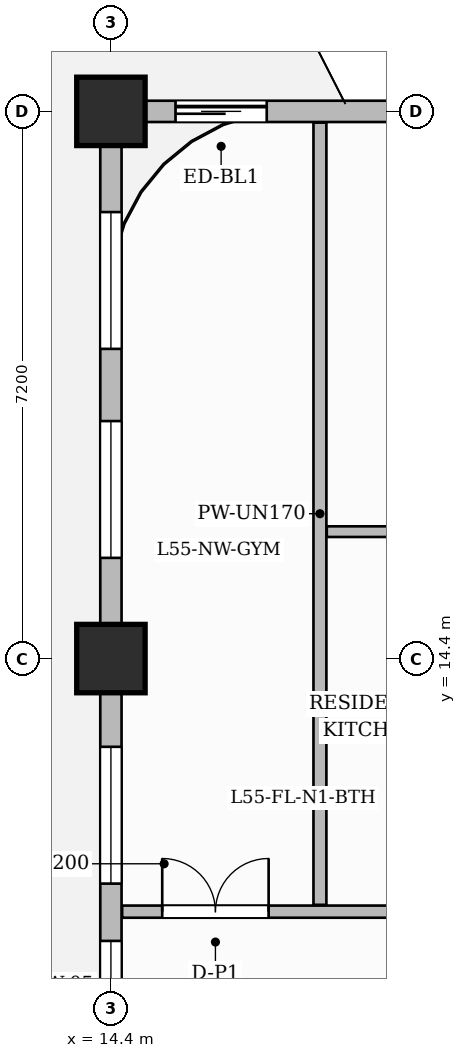
"""IFC4 building model, lengths in metres.
Left out: names, types, materials, properties, quantities, classifications, styles, units other than length and angle.
Written with IfcOpenShell. Run it as: python <this file> out.ifc"""

import sys

from ifc_helpers import new_model, si_unit, direction, frame, frame_2d, origin, origin_2d, place, context, subcontext, project, spatial, rectangle, extrude, source, transform, mapped, element, fill, save


model = new_model("IFC4")
c1 = context("Model", 3, precision=1e-05, world=origin(), true_north=direction((0.0, 1.0)))
c2 = subcontext(c1, "Body", "Model", "MODEL_VIEW")
j1 = project(units=[si_unit("LENGTHUNIT", "METRE"), si_unit("PLANEANGLEUNIT", "RADIAN")], contexts=[c1])
p1 = place(None, origin())
s1 = spatial("IfcSite", under=j1, at=p1, CompositionType="ELEMENT")
p2 = place(p1, origin())
s2 = spatial("IfcBuilding", under=s1, at=p2, CompositionType="ELEMENT")
p3 = place(p2, frame((0.0, 0.0, 221.15)))
s3 = spatial("IfcBuildingStorey", under=s2, at=p3, CompositionType="ELEMENT", Elevation=221.15)
m1 = source(origin(), c2, "Body", "SweptSolid", [
    extrude(rectangle(XDim=0.9, YDim=0.9, at=origin_2d()), origin(), (0.0, 0.0, 1.0), 3.85),
])
for number, where, z_axis, x_axis in (
    (1, (14.4, 14.4, 0.0), (0.0, 0.0, 1.0), (1.0, 0.0, 0.0)),
    (2, (14.4, 21.6, 0.0), (0.0, 0.0, 1.0), (1.0, 0.0, 0.0)),
):
    element("IfcColumn", number, at=place(p3, frame(where, z_axis=z_axis, x_axis=x_axis)), inside=s3, PredefinedType="COLUMN", context=c2, shape_type="MappedRepresentation", body=[
        mapped(m1, transform((0.0, 0.0, 0.0), scale=1.0)),
    ])
p4 = place(p3, frame((14.548, 11.07, 0.0), z_axis=(0.0, 0.0, 1.0), x_axis=(1.0, 0.0, 0.0)))
e3 = element("IfcWall", 3, at=p4, inside=s3, PredefinedType="PARTITIONING", context=c2, shape_type="SweptSolid", body=[
    extrude(rectangle(XDim=15.562, YDim=0.16, at=frame_2d((7.781, 0.0))), origin(), (0.0, 0.0, 1.0), 3.6),
])
p5 = place(p4, frame((0.527, 0.0, 0.0)))
e4 = element("IfcOpeningElement", 4, at=p5, cuts=e3, PredefinedType="OPENING", context=c2, shape_type="SweptSolid", body=[
    extrude(rectangle(XDim=1.4, YDim=2.35, at=frame_2d((0.7, 1.175))), frame((0.0, 0.09, 0.0), z_axis=(0.0, -1.0, 0.0), x_axis=(1.0, 0.0, 0.0)), (0.0, 0.0, 1.0), 0.18),
])
p6 = place(p4, frame((6.527, 0.0, 0.0)))
e5 = element("IfcOpeningElement", 5, at=p6, cuts=e3, PredefinedType="OPENING", context=c2, shape_type="SweptSolid", body=[
    extrude(rectangle(XDim=1.05, YDim=2.25, at=frame_2d((0.525, 1.125))), frame((0.0, 0.09, 0.0), z_axis=(0.0, -1.0, 0.0), x_axis=(1.0, 0.0, 0.0)), (0.0, 0.0, 1.0), 0.18),
])
p7 = place(p3, frame((17.15, 11.16, 0.0), z_axis=(0.0, 0.0, 1.0), x_axis=(0.0, 1.0, 0.0)))
e6 = element("IfcWall", 6, at=p7, inside=s3, PredefinedType="PARTITIONING", context=c2, shape_type="SweptSolid", body=[
    extrude(rectangle(XDim=10.292, YDim=0.17, at=frame_2d((5.146, 0.0))), origin(), (0.0, 0.0, 1.0), 3.6),
])
for number, where, z_axis, x_axis in (
    (7, (17.24, 13.42, 0.0), (0.0, 0.0, 1.0), (1.0, 0.0, 0.0)),
    (8, (17.24, 16.07, 0.0), (0.0, 0.0, 1.0), (1.0, 0.0, 0.0)),
):
    element("IfcWall", number, at=place(p3, frame(where, z_axis=z_axis, x_axis=x_axis)), inside=s3, PredefinedType="PARTITIONING", context=c2, shape_type="SweptSolid", body=[
        extrude(rectangle(XDim=2.07, YDim=0.14, at=frame_2d((1.035, 0.0))), origin(), (0.0, 0.0, 1.0), 3.6),
    ])
p8 = place(p3, frame((14.4, 21.6, 0.0), z_axis=(0.0, 0.0, 1.0), x_axis=(1.0, 0.0, 0.0)))
e9 = element("IfcWall", 9, at=p8, inside=s3, PredefinedType="SOLIDWALL", context=c2, shape_type="SweptSolid", body=[
    extrude(rectangle(XDim=35.4, YDim=0.28, at=frame_2d((17.7, 0.0))), origin(), (0.0, 0.0, 1.0), 3.135),
])
p9 = place(p8, frame((0.85, 0.0, 0.0)))
e10 = element("IfcOpeningElement", 10, at=p9, cuts=e9, PredefinedType="OPENING", context=c2, shape_type="SweptSolid", body=[
    extrude(rectangle(XDim=1.2, YDim=2.2, at=frame_2d((0.6, 1.1))), frame((0.0, 0.15, 0.0), z_axis=(0.0, -1.0, 0.0), x_axis=(1.0, 0.0, 0.0)), (0.0, 0.0, 1.0), 0.3),
])
p10 = place(p8, frame((3.679, 0.0, 0.8)))
e11 = element("IfcOpeningElement", 11, at=p10, cuts=e9, PredefinedType="OPENING", context=c2, shape_type="SweptSolid", body=[
    extrude(rectangle(XDim=1.8, YDim=1.85, at=frame_2d((0.9, 0.925))), frame((0.0, 0.15, 0.0), z_axis=(0.0, -1.0, 0.0), x_axis=(1.0, 0.0, 0.0)), (0.0, 0.0, 1.0), 0.3),
])
p11 = place(p8, frame((8.181, 0.0, 0.8)))
e12 = element("IfcOpeningElement", 12, at=p11, cuts=e9, PredefinedType="OPENING", context=c2, shape_type="SweptSolid", body=[
    extrude(rectangle(XDim=0.95, YDim=1.75, at=frame_2d((0.475, 0.875))), frame((0.0, 0.15, 0.0), z_axis=(0.0, -1.0, 0.0), x_axis=(1.0, 0.0, 0.0)), (0.0, 0.0, 1.0), 0.3),
])
p12 = place(p8, frame((10.564, 0.0, 0.8)))
e13 = element("IfcOpeningElement", 13, at=p12, cuts=e9, PredefinedType="OPENING", context=c2, shape_type="SweptSolid", body=[
    extrude(rectangle(XDim=1.8, YDim=1.85, at=frame_2d((0.9, 0.925))), frame((0.0, 0.15, 0.0), z_axis=(0.0, -1.0, 0.0), x_axis=(1.0, 0.0, 0.0)), (0.0, 0.0, 1.0), 0.3),
])
p13 = place(p8, frame((16.551, 0.0, 0.8)))
e14 = element("IfcOpeningElement", 14, at=p13, cuts=e9, PredefinedType="OPENING", context=c2, shape_type="SweptSolid", body=[
    extrude(rectangle(XDim=1.8, YDim=1.85, at=frame_2d((0.9, 0.925))), frame((0.0, 0.15, 0.0), z_axis=(0.0, -1.0, 0.0), x_axis=(1.0, 0.0, 0.0)), (0.0, 0.0, 1.0), 0.3),
])
p14 = place(p8, frame((22.196, 0.0, 0.8)))
e15 = element("IfcOpeningElement", 15, at=p14, cuts=e9, PredefinedType="OPENING", context=c2, shape_type="SweptSolid", body=[
    extrude(rectangle(XDim=1.8, YDim=1.85, at=frame_2d((0.9, 0.925))), frame((0.0, 0.15, 0.0), z_axis=(0.0, -1.0, 0.0), x_axis=(1.0, 0.0, 0.0)), (0.0, 0.0, 1.0), 0.3),
])
p15 = place(p8, frame((25.329, 0.0, 0.8)))
e16 = element("IfcOpeningElement", 16, at=p15, cuts=e9, PredefinedType="OPENING", context=c2, shape_type="SweptSolid", body=[
    extrude(rectangle(XDim=1.15, YDim=1.8, at=frame_2d((0.575, 0.9))), frame((0.0, 0.15, 0.0), z_axis=(0.0, -1.0, 0.0), x_axis=(1.0, 0.0, 0.0)), (0.0, 0.0, 1.0), 0.3),
])
p16 = place(p8, frame((28.721, 0.0, 0.8)))
e17 = element("IfcOpeningElement", 17, at=p16, cuts=e9, PredefinedType="OPENING", context=c2, shape_type="SweptSolid", body=[
    extrude(rectangle(XDim=0.95, YDim=1.75, at=frame_2d((0.475, 0.875))), frame((0.0, 0.15, 0.0), z_axis=(0.0, -1.0, 0.0), x_axis=(1.0, 0.0, 0.0)), (0.0, 0.0, 1.0), 0.3),
])
p17 = place(p8, frame((31.404, 0.0, 0.8)))
e18 = element("IfcOpeningElement", 18, at=p17, cuts=e9, PredefinedType="OPENING", context=c2, shape_type="SweptSolid", body=[
    extrude(rectangle(XDim=1.8, YDim=1.85, at=frame_2d((0.9, 0.925))), frame((0.0, 0.15, 0.0), z_axis=(0.0, -1.0, 0.0), x_axis=(1.0, 0.0, 0.0)), (0.0, 0.0, 1.0), 0.3),
])
p18 = place(p3, frame((14.4, 0.05, 0.0), z_axis=(0.0, 0.0, 1.0), x_axis=(0.0, 1.0, 0.0)))
e19 = element("IfcWall", 19, at=p18, inside=s3, PredefinedType="SOLIDWALL", context=c2, shape_type="SweptSolid", body=[
    extrude(rectangle(XDim=21.5, YDim=0.28, at=frame_2d((10.75, 0.0))), origin(), (0.0, 0.0, 1.0), 3.135),
])
p19 = place(p18, frame((1.521, 0.0, 0.8)))
e20 = element("IfcOpeningElement", 20, at=p19, cuts=e19, PredefinedType="OPENING", context=c2, shape_type="SweptSolid", body=[
    extrude(rectangle(XDim=1.8, YDim=1.85, at=frame_2d((0.9, 0.925))), frame((0.0, 0.15, 0.0), z_axis=(0.0, -1.0, 0.0), x_axis=(1.0, 0.0, 0.0)), (0.0, 0.0, 1.0), 0.3),
])
p20 = place(p18, frame((4.529, 0.0, 0.8)))
e21 = element("IfcOpeningElement", 21, at=p20, cuts=e19, PredefinedType="OPENING", context=c2, shape_type="SweptSolid", body=[
    extrude(rectangle(XDim=1.4, YDim=1.85, at=frame_2d((0.7, 0.925))), frame((0.0, 0.15, 0.0), z_axis=(0.0, -1.0, 0.0), x_axis=(1.0, 0.0, 0.0)), (0.0, 0.0, 1.0), 0.3),
])
p21 = place(p18, frame((9.485, 0.0, 0.8)))
e22 = element("IfcOpeningElement", 22, at=p21, cuts=e19, PredefinedType="OPENING", context=c2, shape_type="SweptSolid", body=[
    extrude(rectangle(XDim=1.15, YDim=1.8, at=frame_2d((0.575, 0.9))), frame((0.0, 0.15, 0.0), z_axis=(0.0, -1.0, 0.0), x_axis=(1.0, 0.0, 0.0)), (0.0, 0.0, 1.0), 0.3),
])
p22 = place(p18, frame((11.389, 0.0, 0.8)))
e23 = element("IfcOpeningElement", 23, at=p22, cuts=e19, PredefinedType="OPENING", context=c2, shape_type="SweptSolid", body=[
    extrude(rectangle(XDim=1.8, YDim=1.85, at=frame_2d((0.9, 0.925))), frame((0.0, 0.15, 0.0), z_axis=(0.0, -1.0, 0.0), x_axis=(1.0, 0.0, 0.0)), (0.0, 0.0, 1.0), 0.3),
])
p23 = place(p18, frame((15.675, 0.0, 0.8)))
e24 = element("IfcOpeningElement", 24, at=p23, cuts=e19, PredefinedType="OPENING", context=c2, shape_type="SweptSolid", body=[
    extrude(rectangle(XDim=1.8, YDim=1.85, at=frame_2d((0.9, 0.925))), frame((0.0, 0.15, 0.0), z_axis=(0.0, -1.0, 0.0), x_axis=(1.0, 0.0, 0.0)), (0.0, 0.0, 1.0), 0.3),
])
p24 = place(p18, frame((18.425, 0.0, 0.8)))
e25 = element("IfcOpeningElement", 25, at=p24, cuts=e19, PredefinedType="OPENING", context=c2, shape_type="SweptSolid", body=[
    extrude(rectangle(XDim=1.8, YDim=1.85, at=frame_2d((0.9, 0.925))), frame((0.0, 0.15, 0.0), z_axis=(0.0, -1.0, 0.0), x_axis=(1.0, 0.0, 0.0)), (0.0, 0.0, 1.0), 0.3),
])
m2 = source(origin(), c2, "Body", "SweptSolid", [
    extrude(rectangle(XDim=1.4, YDim=2.35, at=frame_2d((0.7, 1.175))), frame((0.0, 0.025, 0.0), z_axis=(0.0, -1.0, 0.0), x_axis=(1.0, 0.0, 0.0)), (0.0, 0.0, 1.0), 0.05),
])
p25 = place(p5, origin())
e26 = element("IfcDoor", 26, at=p25, inside=s3, OperationType="DOUBLE_DOOR_SINGLE_SWING", PredefinedType="DOOR", context=c2, shape_type="MappedRepresentation", body=[
    mapped(m2, transform((0.0, 0.0, 0.0), scale=1.0)),
])
fill(e4, e26)
m3 = source(origin(), c2, "Body", "SweptSolid", [
    extrude(rectangle(XDim=1.2, YDim=2.2, at=frame_2d((0.6, 1.1))), frame((0.0, 0.025, 0.0), z_axis=(0.0, -1.0, 0.0), x_axis=(1.0, 0.0, 0.0)), (0.0, 0.0, 1.0), 0.05),
])
p26 = place(p9, origin())
e27 = element("IfcDoor", 27, at=p26, inside=s3, OperationType="SLIDING_TO_LEFT", PredefinedType="DOOR", context=c2, shape_type="MappedRepresentation", body=[
    mapped(m3, transform((0.0, 0.0, 0.0), scale=1.0)),
])
fill(e10, e27)
m4 = source(origin(), c2, "Body", "SweptSolid", [
    extrude(rectangle(XDim=1.15, YDim=1.8, at=frame_2d((0.575, 0.9))), frame((0.0, 0.03, 0.0), z_axis=(0.0, -1.0, 0.0), x_axis=(1.0, 0.0, 0.0)), (0.0, 0.0, 1.0), 0.06),
])
p27 = place(p21, origin())
e28 = element("IfcWindow", 28, at=p27, inside=s3, PartitioningType="SINGLE_PANEL", PredefinedType="WINDOW", context=c2, shape_type="MappedRepresentation", body=[
    mapped(m4, transform((0.0, 0.0, 0.0), scale=1.0)),
])
fill(e22, e28)
m5 = source(origin(), c2, "Body", "SweptSolid", [
    extrude(rectangle(XDim=1.8, YDim=1.85, at=frame_2d((0.9, 0.925))), frame((0.0, 0.03, 0.0), z_axis=(0.0, -1.0, 0.0), x_axis=(1.0, 0.0, 0.0)), (0.0, 0.0, 1.0), 0.06),
])
p28 = place(p22, origin())
e29 = element("IfcWindow", 29, at=p28, inside=s3, PartitioningType="DOUBLE_PANEL_VERTICAL", PredefinedType="WINDOW", context=c2, shape_type="MappedRepresentation", body=[
    mapped(m5, transform((0.0, 0.0, 0.0), scale=1.0)),
])
fill(e23, e29)
p29 = place(p23, origin())
e30 = element("IfcWindow", 30, at=p29, inside=s3, PartitioningType="DOUBLE_PANEL_VERTICAL", PredefinedType="WINDOW", context=c2, shape_type="MappedRepresentation", body=[
    mapped(m5, transform((0.0, 0.0, 0.0), scale=1.0)),
])
fill(e24, e30)
p30 = place(p24, origin())
e31 = element("IfcWindow", 31, at=p30, inside=s3, PartitioningType="DOUBLE_PANEL_VERTICAL", PredefinedType="WINDOW", context=c2, shape_type="MappedRepresentation", body=[
    mapped(m5, transform((0.0, 0.0, 0.0), scale=1.0)),
])
fill(e25, e31)
save(model, sys.argv[1])
